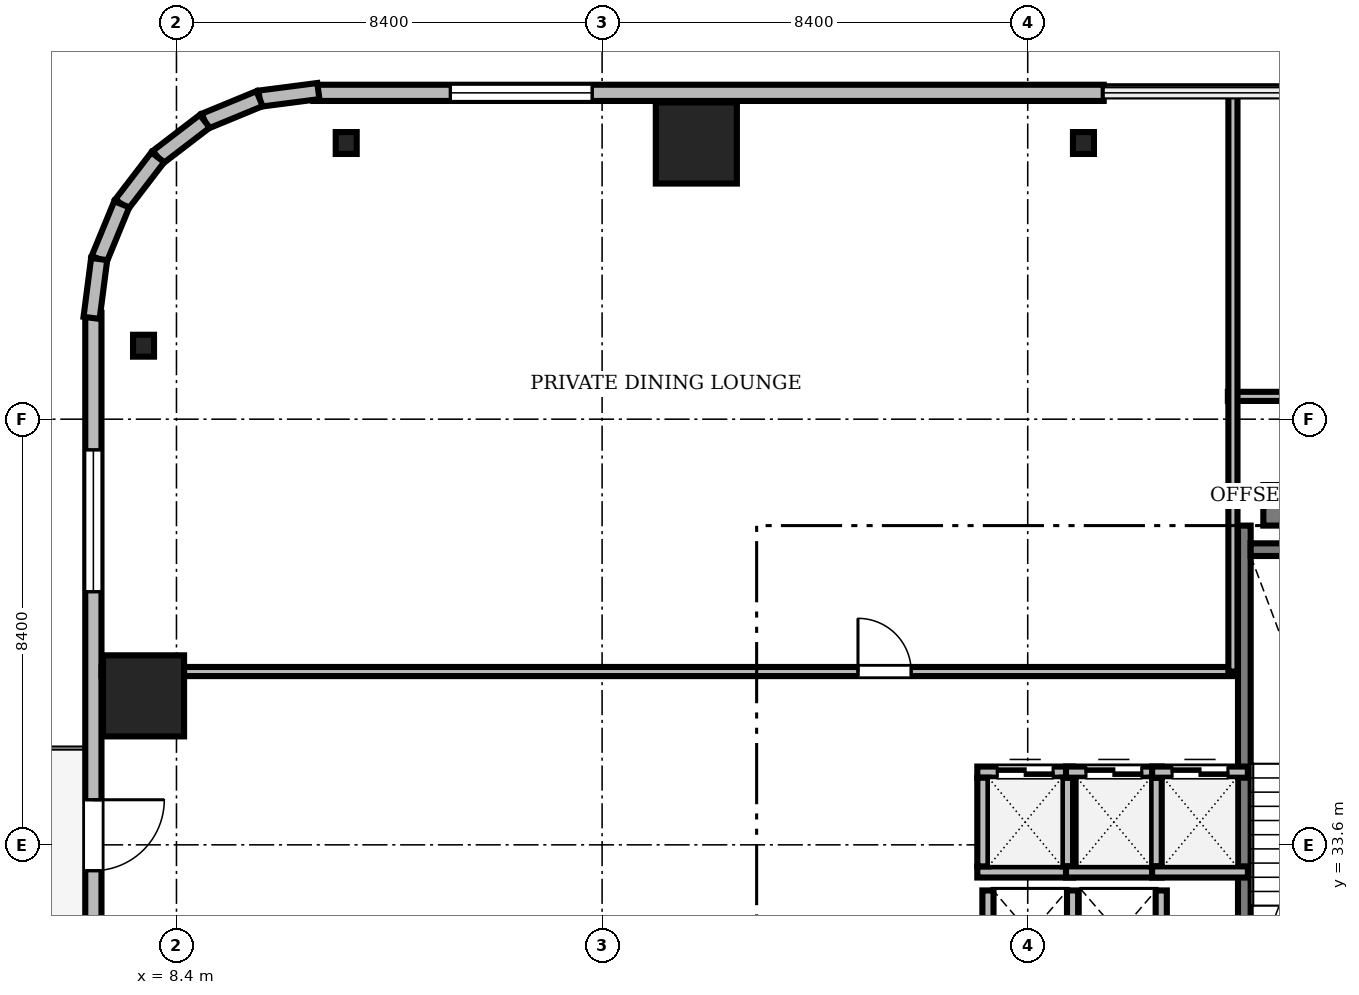
"""IFC4 building model, lengths in metres.
Left out: names, types, materials, properties, quantities, classifications, styles, units other than length and angle.
Written with IfcOpenShell. Run it as: python <this file> out.ifc"""

import sys

from ifc_helpers import new_model, si_unit, direction, frame, frame_2d, origin, origin_2d, place, context, subcontext, project, spatial, rectangle, i_section, extrude, source, transform, mapped, element, fill, save


model = new_model("IFC4")
c1 = context("Model", 3, precision=1e-05, world=origin(), true_north=direction((0.0, 1.0)))
c2 = subcontext(c1, "Body", "Model", "MODEL_VIEW")
j1 = project(units=[si_unit("LENGTHUNIT", "METRE"), si_unit("PLANEANGLEUNIT", "RADIAN")], contexts=[c1])
p1 = place(None, origin())
s1 = spatial("IfcSite", under=j1, at=p1, CompositionType="ELEMENT")
p2 = place(p1, origin())
s2 = spatial("IfcBuilding", under=s1, at=p2, CompositionType="ELEMENT")
p3 = place(p2, frame((0.0, 0.0, 148.3)))
s3 = spatial("IfcBuildingStorey", under=s2, at=p3, CompositionType="ELEMENT", Elevation=148.3)
m1 = source(origin(), c2, "Body", "SweptSolid", [
    extrude(rectangle(XDim=17.52, YDim=0.8, at=frame_2d((8.76, 0.0))), origin(), (0.0, 0.0, 1.0), 3.46),
])
p4 = place(p3, frame((29.85, 40.3, 0.0), z_axis=(0.0, 0.0, 1.0), x_axis=(1.0, 0.0, 0.0)))
e1 = element("IfcWall", 1, at=p4, inside=s3, PredefinedType="SHEAR", context=c2, shape_type="MappedRepresentation", body=[
    mapped(m1, transform((0.0, 0.0, 0.0), scale=1.0)),
])
m2 = source(origin(), c2, "Body", "SweptSolid", [
    extrude(rectangle(XDim=1.6, YDim=1.6, at=origin_2d()), origin(), (0.0, 0.0, 1.0), 3.46),
])
for number, where, z_axis, x_axis in (
    (2, (18.66, 47.45, 0.0), (0.0, 0.0, 1.0), (1.0, 0.0, 0.0)),
    (3, (7.75, 36.54, 0.0), (0.0, 0.0, 1.0), (1.0, 0.0, 0.0)),
):
    element("IfcColumn", number, at=place(p3, frame(where, z_axis=z_axis, x_axis=x_axis)), inside=s3, PredefinedType="COLUMN", context=c2, shape_type="MappedRepresentation", body=[
        mapped(m2, transform((0.0, 0.0, 0.0), scale=1.0)),
    ])
m3 = source(origin(), c2, "Body", "SweptSolid", [
    extrude(i_section(OverallWidth=0.414, OverallDepth=0.432, WebThickness=0.026, FlangeThickness=0.04, FilletRadius=0.015, at=origin_2d()), origin(), (0.0, 0.0, 1.0), 3.46),
])
for number, where, z_axis, x_axis in (
    (4, (26.3, 47.45, 0.0), (0.0, 0.0, 1.0), (1.0, 0.0, 0.0)),
    (5, (11.75, 47.45, 0.0), (0.0, 0.0, 1.0), (1.0, 0.0, 0.0)),
    (6, (7.75, 43.45, 0.0), (0.0, 0.0, 1.0), (1.0, 0.0, 0.0)),
):
    element("IfcColumn", number, at=place(p3, frame(where, z_axis=z_axis, x_axis=x_axis)), inside=s3, PredefinedType="COLUMN", context=c2, shape_type="MappedRepresentation", body=[
        mapped(m3, transform((0.0, 0.0, 0.0), scale=1.0)),
    ])
m4 = source(origin(), c2, "Body", "SweptSolid", [
    extrude(rectangle(XDim=15.6, YDim=0.32, at=frame_2d((7.8, 0.0))), origin(), (0.0, 0.0, 1.0), 3.46),
])
p5 = place(p3, frame((26.7, 48.44, 0.0), z_axis=(0.0, 0.0, 1.0), x_axis=(-1.0, 0.0, 0.0)))
e7 = element("IfcWall", 7, at=p5, inside=s3, PredefinedType="SOLIDWALL", context=c2, shape_type="MappedRepresentation", body=[
    mapped(m4, transform((0.0, 0.0, 0.0), scale=1.0)),
])
m5 = source(origin(), c2, "Body", "SweptSolid", [
    extrude(rectangle(XDim=2.8, YDim=2.4, at=frame_2d((1.4, 1.2))), frame((0.0, 0.17, 0.0), z_axis=(0.0, -1.0, 0.0), x_axis=(1.0, 0.0, 0.0)), (0.0, 0.0, 1.0), 0.34),
])
p6 = place(p5, frame((10.095, 0.0, 0.72)))
e8 = element("IfcOpeningElement", 8, at=p6, cuts=e7, PredefinedType="OPENING", context=c2, shape_type="MappedRepresentation", body=[
    mapped(m5, transform((0.0, 0.0, 0.0), scale=1.0)),
])
m6 = source(origin(), c2, "Body", "SweptSolid", [
    extrude(rectangle(XDim=15.6, YDim=0.32, at=frame_2d((7.8, 0.0))), origin(), (0.0, 0.0, 1.0), 3.46),
])
p7 = place(p3, frame((6.76, 44.1, 0.0), z_axis=(0.0, 0.0, 1.0), x_axis=(0.0, -1.0, 0.0)))
e9 = element("IfcWall", 9, at=p7, inside=s3, PredefinedType="SOLIDWALL", context=c2, shape_type="MappedRepresentation", body=[
    mapped(m6, transform((0.0, 0.0, 0.0), scale=1.0)),
])
m7 = source(origin(), c2, "Body", "SweptSolid", [
    extrude(rectangle(XDim=1.4, YDim=2.3, at=frame_2d((0.7, 1.15))), frame((0.0, 0.17, 0.0), z_axis=(0.0, -1.0, 0.0), x_axis=(1.0, 0.0, 0.0)), (0.0, 0.0, 1.0), 0.34),
])
p8 = place(p7, frame((9.61, 0.0, 0.0)))
e10 = element("IfcOpeningElement", 10, at=p8, cuts=e9, PredefinedType="OPENING", context=c2, shape_type="MappedRepresentation", body=[
    mapped(m7, transform((0.0, 0.0, 0.0), scale=1.0)),
])
p9 = place(p7, frame((2.705, 0.0, 0.72)))
e11 = element("IfcOpeningElement", 11, at=p9, cuts=e9, PredefinedType="OPENING", context=c2, shape_type="MappedRepresentation", body=[
    mapped(m5, transform((0.0, 0.0, 0.0), scale=1.0)),
])
m8 = source(origin(), c2, "Body", "SweptSolid", [
    extrude(rectangle(XDim=1.17, YDim=0.32, at=frame_2d((0.585, 0.0))), origin(), (0.0, 0.0, 1.0), 3.46),
])
p10 = place(p3, frame((11.2, 48.476, 0.0), z_axis=(0.0, 0.0, 1.0), x_axis=(-0.991735963317, -0.128295670475, 0.0)))
e12 = element("IfcWall", 12, at=p10, inside=s3, PredefinedType="SOLIDWALL", context=c2, shape_type="MappedRepresentation", body=[
    mapped(m8, transform((0.0, 0.0, 0.0), scale=1.0)),
])
m9 = source(origin(), c2, "Body", "SweptSolid", [
    extrude(rectangle(XDim=1.169, YDim=0.32, at=frame_2d((0.584, 0.0))), origin(), (0.0, 0.0, 1.0), 3.46),
])
p11 = place(p3, frame((10.04, 48.325, 0.0), z_axis=(0.0, 0.0, 1.0), x_axis=(-0.924552646638, -0.381054331552, 0.0)))
e13 = element("IfcWall", 13, at=p11, inside=s3, PredefinedType="SOLIDWALL", context=c2, shape_type="MappedRepresentation", body=[
    mapped(m9, transform((0.0, 0.0, 0.0), scale=1.0)),
])
m10 = source(origin(), c2, "Body", "SweptSolid", [
    extrude(rectangle(XDim=1.169, YDim=0.32, at=frame_2d((0.584, 0.0))), origin(), (0.0, 0.0, 1.0), 3.46),
])
p12 = place(p3, frame((8.959, 47.88, 0.0), z_axis=(0.0, 0.0, 1.0), x_axis=(-0.793663520347, -0.608356981114, 0.0)))
e14 = element("IfcWall", 14, at=p12, inside=s3, PredefinedType="SOLIDWALL", context=c2, shape_type="MappedRepresentation", body=[
    mapped(m10, transform((0.0, 0.0, 0.0), scale=1.0)),
])
m11 = source(origin(), c2, "Body", "SweptSolid", [
    extrude(rectangle(XDim=1.169, YDim=0.32, at=frame_2d((0.584, 0.0))), origin(), (0.0, 0.0, 1.0), 3.46),
])
p13 = place(p3, frame((8.031, 47.169, 0.0), z_axis=(0.0, 0.0, 1.0), x_axis=(-0.608387696831, -0.793639975269, 0.0)))
e15 = element("IfcWall", 15, at=p13, inside=s3, PredefinedType="SOLIDWALL", context=c2, shape_type="MappedRepresentation", body=[
    mapped(m11, transform((0.0, 0.0, 0.0), scale=1.0)),
])
p14 = place(p3, frame((7.32, 46.241, 0.0), z_axis=(0.0, 0.0, 1.0), x_axis=(-0.381054331552, -0.924552646638, 0.0)))
e16 = element("IfcWall", 16, at=p14, inside=s3, PredefinedType="SOLIDWALL", context=c2, shape_type="MappedRepresentation", body=[
    mapped(m9, transform((0.0, 0.0, 0.0), scale=1.0)),
])
p15 = place(p3, frame((6.875, 45.16, 0.0), z_axis=(0.0, 0.0, 1.0), x_axis=(-0.128295670475, -0.991735963317, 0.0)))
e17 = element("IfcWall", 17, at=p15, inside=s3, PredefinedType="SOLIDWALL", context=c2, shape_type="MappedRepresentation", body=[
    mapped(m8, transform((0.0, 0.0, 0.0), scale=1.0)),
])
m12 = source(origin(), c2, "Body", "SweptSolid", [
    extrude(rectangle(XDim=9.25, YDim=0.25, at=frame_2d((4.625, 0.0))), origin(), (0.0, 0.0, 1.0), 3.5),
])
p16 = place(p3, frame((29.475, 30.65, 0.0), z_axis=(0.0, 0.0, 1.0), x_axis=(0.0, 1.0, 0.0)))
e18 = element("IfcWall", 18, at=p16, inside=s3, PredefinedType="SOLIDWALL", context=c2, shape_type="MappedRepresentation", body=[
    mapped(m12, transform((0.0, 0.0, 0.0), scale=1.0)),
])
m13 = source(origin(), c2, "Body", "SweptSolid", [
    extrude(rectangle(XDim=3.15, YDim=0.25, at=frame_2d((1.575, 0.0))), origin(), (0.0, 0.0, 1.0), 3.5),
])
p17 = place(p3, frame((29.6, 39.425, 0.0), z_axis=(0.0, 0.0, 1.0), x_axis=(1.0, 0.0, 0.0)))
e19 = element("IfcWall", 19, at=p17, inside=s3, PredefinedType="SOLIDWALL", context=c2, shape_type="MappedRepresentation", body=[
    mapped(m13, transform((0.0, 0.0, 0.0), scale=1.0)),
])
m14 = source(origin(), c2, "Body", "SweptSolid", [
    extrude(rectangle(XDim=1.89, YDim=0.22, at=frame_2d((0.945, 0.0))), origin(), (0.0, 0.0, 1.0), 3.46),
])
p18 = place(p3, frame((24.205, 33.065, 0.0), z_axis=(0.0, 0.0, 1.0), x_axis=(1.0, 0.0, 0.0)))
e20 = element("IfcWall", 20, at=p18, inside=s3, PredefinedType="SOLIDWALL", context=c2, shape_type="MappedRepresentation", body=[
    mapped(m14, transform((0.0, 0.0, 0.0), scale=1.0)),
])
p19 = place(p3, frame((24.205, 35.035, 0.0), z_axis=(0.0, 0.0, 1.0), x_axis=(1.0, 0.0, 0.0)))
e21 = element("IfcWall", 21, at=p19, inside=s3, PredefinedType="SOLIDWALL", context=c2, shape_type="MappedRepresentation", body=[
    mapped(m14, transform((0.0, 0.0, 0.0), scale=1.0)),
])
m15 = source(origin(), c2, "Body", "SweptSolid", [
    extrude(rectangle(XDim=1.1, YDim=2.2, at=frame_2d((0.55, 1.1))), frame((0.0, 0.12, 0.0), z_axis=(0.0, -1.0, 0.0), x_axis=(1.0, 0.0, 0.0)), (0.0, 0.0, 1.0), 0.24),
])
p20 = place(p19, frame((0.395, 0.0, 0.0)))
e22 = element("IfcOpeningElement", 22, at=p20, cuts=e21, PredefinedType="OPENING", context=c2, shape_type="MappedRepresentation", body=[
    mapped(m15, transform((0.0, 0.0, 0.0), scale=1.0)),
])
m16 = source(origin(), c2, "Body", "SweptSolid", [
    extrude(rectangle(XDim=1.75, YDim=0.22, at=frame_2d((0.875, 0.0))), origin(), (0.0, 0.0, 1.0), 3.46),
])
for number, where, z_axis, x_axis in (
    (23, (24.315, 33.175, 0.0), (0.0, 0.0, 1.0), (0.0, 1.0, 0.0)),
    (24, (25.985, 33.175, 0.0), (0.0, 0.0, 1.0), (0.0, 1.0, 0.0)),
):
    element("IfcWall", number, at=place(p3, frame(where, z_axis=z_axis, x_axis=x_axis)), inside=s3, PredefinedType="SOLIDWALL", context=c2, shape_type="MappedRepresentation", body=[
        mapped(m16, transform((0.0, 0.0, 0.0), scale=1.0)),
    ])
p21 = place(p3, frame((25.955, 33.065, 0.0), z_axis=(0.0, 0.0, 1.0), x_axis=(1.0, 0.0, 0.0)))
e25 = element("IfcWall", 25, at=p21, inside=s3, PredefinedType="SOLIDWALL", context=c2, shape_type="MappedRepresentation", body=[
    mapped(m14, transform((0.0, 0.0, 0.0), scale=1.0)),
])
p22 = place(p3, frame((25.955, 35.035, 0.0), z_axis=(0.0, 0.0, 1.0), x_axis=(1.0, 0.0, 0.0)))
e26 = element("IfcWall", 26, at=p22, inside=s3, PredefinedType="SOLIDWALL", context=c2, shape_type="MappedRepresentation", body=[
    mapped(m14, transform((0.0, 0.0, 0.0), scale=1.0)),
])
p23 = place(p22, frame((0.395, 0.0, 0.0)))
e27 = element("IfcOpeningElement", 27, at=p23, cuts=e26, PredefinedType="OPENING", context=c2, shape_type="MappedRepresentation", body=[
    mapped(m15, transform((0.0, 0.0, 0.0), scale=1.0)),
])
p24 = place(p3, frame((27.735, 33.175, 0.0), z_axis=(0.0, 0.0, 1.0), x_axis=(0.0, 1.0, 0.0)))
e28 = element("IfcWall", 28, at=p24, inside=s3, PredefinedType="SOLIDWALL", context=c2, shape_type="MappedRepresentation", body=[
    mapped(m16, transform((0.0, 0.0, 0.0), scale=1.0)),
])
p25 = place(p3, frame((27.655, 33.065, 0.0), z_axis=(0.0, 0.0, 1.0), x_axis=(1.0, 0.0, 0.0)))
e29 = element("IfcWall", 29, at=p25, inside=s3, PredefinedType="SOLIDWALL", context=c2, shape_type="MappedRepresentation", body=[
    mapped(m14, transform((0.0, 0.0, 0.0), scale=1.0)),
])
p26 = place(p3, frame((27.655, 35.035, 0.0), z_axis=(0.0, 0.0, 1.0), x_axis=(1.0, 0.0, 0.0)))
e30 = element("IfcWall", 30, at=p26, inside=s3, PredefinedType="SOLIDWALL", context=c2, shape_type="MappedRepresentation", body=[
    mapped(m14, transform((0.0, 0.0, 0.0), scale=1.0)),
])
p27 = place(p26, frame((0.395, 0.0, 0.0)))
e31 = element("IfcOpeningElement", 31, at=p27, cuts=e30, PredefinedType="OPENING", context=c2, shape_type="MappedRepresentation", body=[
    mapped(m15, transform((0.0, 0.0, 0.0), scale=1.0)),
])
m17 = source(origin(), c2, "Body", "SweptSolid", [
    extrude(rectangle(XDim=1.7, YDim=0.22, at=frame_2d((0.85, 0.0))), origin(), (0.0, 0.0, 1.0), 3.46),
])
for number, where, z_axis, x_axis in (
    (32, (24.415, 31.0, 0.0), (0.0, 0.0, 1.0), (0.0, 1.0, 0.0)),
    (33, (26.085, 31.0, 0.0), (0.0, 0.0, 1.0), (0.0, 1.0, 0.0)),
    (34, (27.835, 31.0, 0.0), (0.0, 0.0, 1.0), (0.0, 1.0, 0.0)),
):
    element("IfcWall", number, at=place(p3, frame(where, z_axis=z_axis, x_axis=x_axis)), inside=s3, PredefinedType="SOLIDWALL", context=c2, shape_type="MappedRepresentation", body=[
        mapped(m17, transform((0.0, 0.0, 0.0), scale=1.0)),
    ])
m18 = source(origin(), c2, "Body", "SweptSolid", [
    extrude(rectangle(XDim=23.928, YDim=0.18, at=frame_2d((11.964, 0.0))), origin(), (0.0, 0.0, 1.0), 2.702),
])
p28 = place(p3, frame((29.15, 42.45, 0.0), z_axis=(0.0, 0.0, 1.0), x_axis=(1.0, 0.0, 0.0)))
e35 = element("IfcWall", 35, at=p28, inside=s3, PredefinedType="PARTITIONING", context=c2, shape_type="MappedRepresentation", body=[
    mapped(m18, transform((0.0, 0.0, 0.0), scale=1.0)),
])
m19 = source(origin(), c2, "Body", "SweptSolid", [
    extrude(rectangle(XDim=1.05, YDim=2.2, at=frame_2d((0.525, 1.1))), frame((0.0, 0.1, 0.0), z_axis=(0.0, -1.0, 0.0), x_axis=(1.0, 0.0, 0.0)), (0.0, 0.0, 1.0), 0.2),
])
p29 = place(p28, frame((4.5, 0.0, 0.0)))
e36 = element("IfcOpeningElement", 36, at=p29, cuts=e35, PredefinedType="OPENING", context=c2, shape_type="MappedRepresentation", body=[
    mapped(m19, transform((0.0, 0.0, 0.0), scale=1.0)),
])
m20 = source(origin(), c2, "Body", "SweptSolid", [
    extrude(rectangle(XDim=22.328, YDim=0.18, at=frame_2d((11.164, 0.0))), origin(), (0.0, 0.0, 1.0), 2.702),
])
p30 = place(p3, frame((6.922, 37.02, 0.0), z_axis=(0.0, 0.0, 1.0), x_axis=(1.0, 0.0, 0.0)))
e37 = element("IfcWall", 37, at=p30, inside=s3, PredefinedType="PARTITIONING", context=c2, shape_type="MappedRepresentation", body=[
    mapped(m20, transform((0.0, 0.0, 0.0), scale=1.0)),
])
p31 = place(p30, frame((14.928, 0.0, 0.0)))
e38 = element("IfcOpeningElement", 38, at=p31, cuts=e37, PredefinedType="OPENING", context=c2, shape_type="MappedRepresentation", body=[
    mapped(m19, transform((0.0, 0.0, 0.0), scale=1.0)),
])
m21 = source(origin(), c2, "Body", "SweptSolid", [
    extrude(rectangle(XDim=11.45, YDim=0.18, at=frame_2d((5.725, 0.0))), origin(), (0.0, 0.0, 1.0), 2.702),
])
p32 = place(p3, frame((29.25, 37.02, 0.0), z_axis=(0.0, 0.0, 1.0), x_axis=(0.0, 1.0, 0.0)))
e39 = element("IfcWall", 39, at=p32, inside=s3, PredefinedType="PARTITIONING", context=c2, shape_type="MappedRepresentation", body=[
    mapped(m21, transform((0.0, 0.0, 0.0), scale=1.0)),
])
m22 = source(origin(), c2, "Body", "SweptSolid", [
    extrude(rectangle(XDim=2.8, YDim=2.4, at=frame_2d((1.4, 1.2))), frame((0.0, 0.03, 0.0), z_axis=(0.0, -1.0, 0.0), x_axis=(1.0, 0.0, 0.0)), (0.0, 0.0, 1.0), 0.06),
])
p33 = place(p6, origin())
e40 = element("IfcWindow", 40, at=p33, inside=s3, PartitioningType="SINGLE_PANEL", PredefinedType="WINDOW", context=c2, shape_type="MappedRepresentation", body=[
    mapped(m22, transform((0.0, 0.0, 0.0), scale=1.0)),
])
fill(e8, e40)
m23 = source(origin(), c2, "Body", "SweptSolid", [
    extrude(rectangle(XDim=1.4, YDim=2.3, at=frame_2d((0.7, 1.15))), frame((0.0, 0.025, 0.0), z_axis=(0.0, -1.0, 0.0), x_axis=(1.0, 0.0, 0.0)), (0.0, 0.0, 1.0), 0.05),
])
p34 = place(p8, frame((1.4, 0.0, 0.0), z_axis=(0.0, 0.0, 1.0), x_axis=(-1.0, 0.0, 0.0)))
e41 = element("IfcDoor", 41, at=p34, inside=s3, OperationType="DOUBLE_DOOR_SLIDING", PredefinedType="DOOR", context=c2, shape_type="MappedRepresentation", body=[
    mapped(m23, transform((0.0, 0.0, 0.0), scale=1.0)),
])
fill(e10, e41)
p35 = place(p9, origin())
e42 = element("IfcWindow", 42, at=p35, inside=s3, PartitioningType="SINGLE_PANEL", PredefinedType="WINDOW", context=c2, shape_type="MappedRepresentation", body=[
    mapped(m22, transform((0.0, 0.0, 0.0), scale=1.0)),
])
fill(e11, e42)
m24 = source(origin(), c2, "Body", "SweptSolid", [
    extrude(rectangle(XDim=1.1, YDim=2.2, at=frame_2d((0.55, 1.1))), frame((0.0, 0.025, 0.0), z_axis=(0.0, -1.0, 0.0), x_axis=(1.0, 0.0, 0.0)), (0.0, 0.0, 1.0), 0.05),
])
p36 = place(p20, origin())
e43 = element("IfcDoor", 43, at=p36, inside=s3, OperationType="DOUBLE_DOOR_SLIDING", PredefinedType="DOOR", context=c2, shape_type="MappedRepresentation", body=[
    mapped(m24, transform((0.0, 0.0, 0.0), scale=1.0)),
])
fill(e22, e43)
p37 = place(p23, origin())
e44 = element("IfcDoor", 44, at=p37, inside=s3, OperationType="DOUBLE_DOOR_SLIDING", PredefinedType="DOOR", context=c2, shape_type="MappedRepresentation", body=[
    mapped(m24, transform((0.0, 0.0, 0.0), scale=1.0)),
])
fill(e27, e44)
p38 = place(p27, origin())
e45 = element("IfcDoor", 45, at=p38, inside=s3, OperationType="DOUBLE_DOOR_SLIDING", PredefinedType="DOOR", context=c2, shape_type="MappedRepresentation", body=[
    mapped(m24, transform((0.0, 0.0, 0.0), scale=1.0)),
])
fill(e31, e45)
m25 = source(origin(), c2, "Body", "SweptSolid", [
    extrude(rectangle(XDim=1.05, YDim=2.2, at=frame_2d((0.525, 1.1))), frame((0.0, 0.025, 0.0), z_axis=(0.0, -1.0, 0.0), x_axis=(1.0, 0.0, 0.0)), (0.0, 0.0, 1.0), 0.05),
])
p39 = place(p31, origin())
e46 = element("IfcDoor", 46, at=p39, inside=s3, OperationType="SINGLE_SWING_LEFT", PredefinedType="DOOR", context=c2, shape_type="MappedRepresentation", body=[
    mapped(m25, transform((0.0, 0.0, 0.0), scale=1.0)),
])
fill(e38, e46)
save(model, sys.argv[1])
